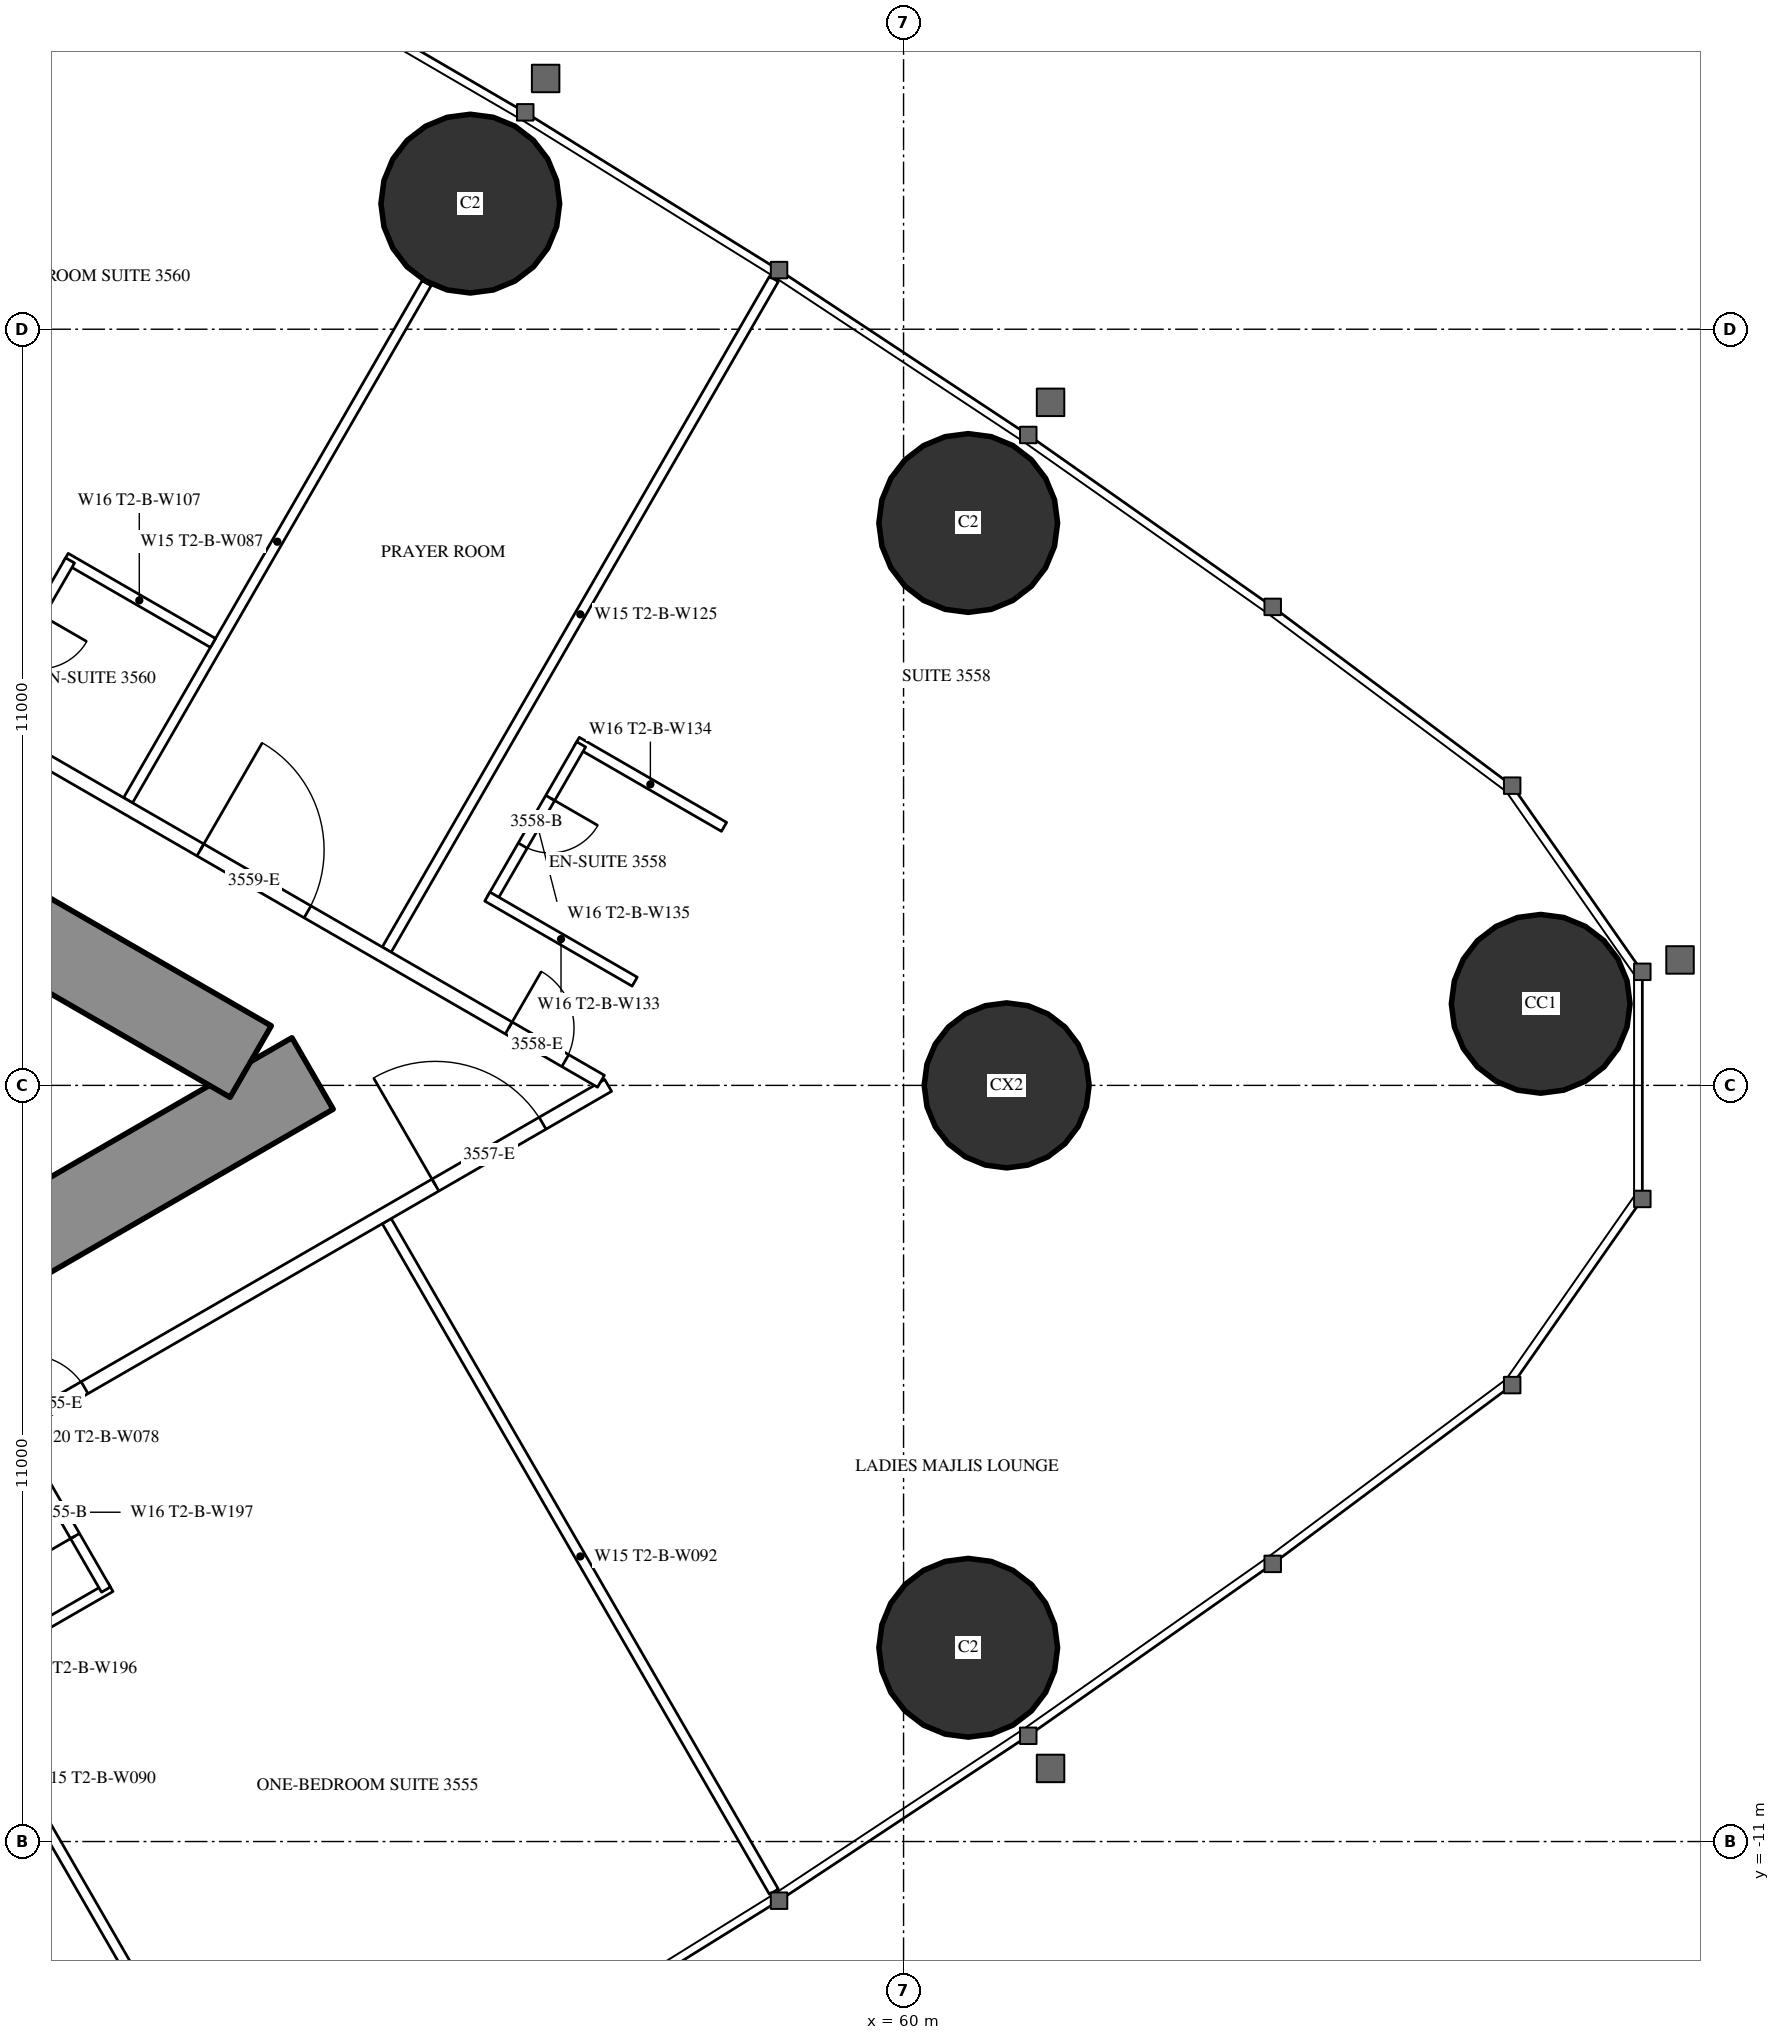
"""IFC4 building model, lengths in metres.
Left out: names, types, materials, properties, quantities, classifications, styles, units other than length and angle.
Written with IfcOpenShell. Run it as: python <this file> out.ifc"""

import sys

from ifc_helpers import new_model, si_unit, direction, frame, frame_2d, origin, origin_2d, place, context, subcontext, project, spatial, rectangle, circle, hollow_circle, extrude, element, fill, save


model = new_model("IFC4")
c1 = context("Model", 3, precision=1e-05, world=origin(), true_north=direction((0.0, 1.0)))
c2 = subcontext(c1, "Body", "Model", "MODEL_VIEW")
j1 = project(units=[si_unit("LENGTHUNIT", "METRE"), si_unit("PLANEANGLEUNIT", "RADIAN")], contexts=[c1])
p1 = place(None, origin())
s1 = spatial("IfcSite", under=j1, at=p1, CompositionType="ELEMENT")
p2 = place(p1, origin())
s2 = spatial("IfcBuilding", under=s1, at=p2, CompositionType="ELEMENT")
p3 = place(p2, frame((0.0, 0.0, 132.6)))
s3 = spatial("IfcBuildingStorey", under=s2, at=p3, CompositionType="ELEMENT", Elevation=132.6)
for number, where, z_axis, x_axis in (
    (1, (69.269, 1.187, 0.0), (0.0, 0.0, 1.0), (1.0, 0.0, 0.0)),
    (2, (60.941, 8.181, 0.0), (0.0, 0.0, 1.0), (1.0, 0.0, 0.0)),
    (3, (53.697, 12.827, 0.0), (0.0, 0.0, 1.0), (1.0, 0.0, 0.0)),
    (4, (60.941, -8.181, 0.0), (0.0, 0.0, 1.0), (1.0, 0.0, 0.0)),
):
    element("IfcColumn", number, at=place(p3, frame(where, z_axis=z_axis, x_axis=x_axis)), inside=s3, PredefinedType="COLUMN", context=c2, shape_type="SweptSolid", body=[
        extrude(hollow_circle(Radius=1.3, WallThickness=0.1, at=origin_2d()), origin(), (0.0, 0.0, 1.0), 3.5),
    ])
p4 = place(p3, frame((61.5, 0.0, 0.0), z_axis=(0.0, 0.0, 1.0), x_axis=(1.0, 0.0, 0.0)))
e5 = element("IfcColumn", 5, at=p4, inside=s3, PredefinedType="COLUMN", context=c2, shape_type="SweptSolid", body=[
    extrude(circle(Radius=1.2, at=origin_2d()), origin(), (0.0, 0.0, 1.0), 3.5),
])
p5 = place(p3, frame((27.2, -13.8, 0.0), z_axis=(0.0, 0.0, 1.0), x_axis=(0.866027159892, 0.499996958321, 0.0)))
e6 = element("IfcWall", 6, at=p5, inside=s3, PredefinedType="SHEAR", context=c2, shape_type="SweptSolid", body=[
    extrude(rectangle(XDim=27.947, YDim=1.2, at=frame_2d((13.973, 0.0))), origin(), (0.0, 0.0, 1.0), 3.5),
])
p6 = place(p5, frame((4.6, 0.0, 0.0)))
e7 = element("IfcOpeningElement", 7, at=p6, cuts=e6, PredefinedType="OPENING", context=c2, shape_type="SweptSolid", body=[
    extrude(rectangle(XDim=1.0, YDim=2.2, at=frame_2d((0.5, 1.1))), frame((0.0, 0.61, 0.0), z_axis=(0.0, -1.0, 0.0), x_axis=(1.0, 0.0, 0.0)), (0.0, 0.0, 1.0), 1.22),
])
p7 = place(p5, frame((13.395, 0.0, 0.0)))
e8 = element("IfcOpeningElement", 8, at=p7, cuts=e6, PredefinedType="OPENING", context=c2, shape_type="SweptSolid", body=[
    extrude(rectangle(XDim=1.8, YDim=2.2, at=frame_2d((0.9, 1.1))), frame((0.0, 0.61, 0.0), z_axis=(0.0, -1.0, 0.0), x_axis=(1.0, 0.0, 0.0)), (0.0, 0.0, 1.0), 1.22),
])
p8 = place(p3, frame((27.2, 13.8, 0.0), z_axis=(0.0, 0.0, 1.0), x_axis=(0.866024515034, -0.500001539357, 0.0)))
e9 = element("IfcWall", 9, at=p8, inside=s3, PredefinedType="SHEAR", context=c2, shape_type="SweptSolid", body=[
    extrude(rectangle(XDim=26.907, YDim=1.2, at=frame_2d((13.454, 0.0))), origin(), (0.0, 0.0, 1.0), 3.5),
])
p9 = place(p8, frame((4.6, 0.0, 0.0)))
e10 = element("IfcOpeningElement", 10, at=p9, cuts=e9, PredefinedType="OPENING", context=c2, shape_type="SweptSolid", body=[
    extrude(rectangle(XDim=1.0, YDim=2.2, at=frame_2d((0.5, 1.1))), frame((0.0, 0.61, 0.0), z_axis=(0.0, -1.0, 0.0), x_axis=(1.0, 0.0, 0.0)), (0.0, 0.0, 1.0), 1.22),
])
p10 = place(p8, frame((13.395, 0.0, 0.0)))
e11 = element("IfcOpeningElement", 11, at=p10, cuts=e9, PredefinedType="OPENING", context=c2, shape_type="SweptSolid", body=[
    extrude(rectangle(XDim=1.8, YDim=2.2, at=frame_2d((0.9, 1.1))), frame((0.0, 0.61, 0.0), z_axis=(0.0, -1.0, 0.0), x_axis=(1.0, 0.0, 0.0)), (0.0, 0.0, 1.0), 1.22),
])
p11 = place(p3, frame((44.954, -6.321, 0.0), z_axis=(0.0, 0.0, 1.0), x_axis=(0.500018676722, -0.866014620505, 0.0)))
e12 = element("IfcWall", 12, at=p11, inside=s3, PredefinedType="PARTITIONING", context=c2, shape_type="SweptSolid", body=[
    extrude(rectangle(XDim=8.704, YDim=0.15, at=frame_2d((4.352, 0.0))), origin(), (0.0, 0.0, 1.0), 2.2),
])
p12 = place(p3, frame((52.481, -1.975, 0.0), z_axis=(0.0, 0.0, 1.0), x_axis=(0.500003867771, -0.866023170714, 0.0)))
e13 = element("IfcWall", 13, at=p12, inside=s3, PredefinedType="PARTITIONING", context=c2, shape_type="SweptSolid", body=[
    extrude(rectangle(XDim=11.265, YDim=0.15, at=frame_2d((5.632, 0.0))), origin(), (0.0, 0.0, 1.0), 3.25),
])
p13 = place(p3, frame((48.719, 4.147, 0.0), z_axis=(0.0, 0.0, 1.0), x_axis=(0.499993328235, 0.866029255696, 0.0)))
e14 = element("IfcWall", 14, at=p13, inside=s3, PredefinedType="PARTITIONING", context=c2, shape_type="SweptSolid", body=[
    extrude(rectangle(XDim=8.686, YDim=0.15, at=frame_2d((4.343, 0.0))), origin(), (0.0, 0.0, 1.0), 2.2),
])
p14 = place(p3, frame((52.481, 1.975, 0.0), z_axis=(0.0, 0.0, 1.0), x_axis=(0.500003867771, 0.866023170714, 0.0)))
e15 = element("IfcWall", 15, at=p14, inside=s3, PredefinedType="PARTITIONING", context=c2, shape_type="SweptSolid", body=[
    extrude(rectangle(XDim=11.265, YDim=0.15, at=frame_2d((5.632, 0.0))), origin(), (0.0, 0.0, 1.0), 3.25),
])
p15 = place(p3, frame((37.96, -10.243, 0.0), z_axis=(0.0, 0.0, 1.0), x_axis=(0.866026429433, 0.499998223521, 0.0)))
e16 = element("IfcWall", 16, at=p15, inside=s3, PredefinedType="PARTITIONING", context=c2, shape_type="SweptSolid", body=[
    extrude(rectangle(XDim=20.487, YDim=0.2, at=frame_2d((10.243, 0.0))), origin(), (0.0, 0.0, 1.0), 3.25),
])
p16 = place(p15, frame((10.743, 0.0, 0.0)))
e17 = element("IfcOpeningElement", 17, at=p16, cuts=e16, PredefinedType="OPENING", context=c2, shape_type="SweptSolid", body=[
    extrude(rectangle(XDim=0.95, YDim=2.2, at=frame_2d((0.475, 1.1))), frame((0.0, 0.11, 0.0), z_axis=(0.0, -1.0, 0.0), x_axis=(1.0, 0.0, 0.0)), (0.0, 0.0, 1.0), 0.22),
])
p17 = place(p15, frame((17.586, 0.0, 0.0)))
e18 = element("IfcOpeningElement", 18, at=p17, cuts=e16, PredefinedType="OPENING", context=c2, shape_type="SweptSolid", body=[
    extrude(rectangle(XDim=1.8, YDim=2.2, at=frame_2d((0.9, 1.1))), frame((0.0, 0.11, 0.0), z_axis=(0.0, -1.0, 0.0), x_axis=(1.0, 0.0, 0.0)), (0.0, 0.0, 1.0), 0.22),
])
p18 = place(p15, frame((0.6, 0.0, 0.0)))
e19 = element("IfcOpeningElement", 19, at=p18, cuts=e16, PredefinedType="OPENING", context=c2, shape_type="SweptSolid", body=[
    extrude(rectangle(XDim=0.95, YDim=2.2, at=frame_2d((0.475, 1.1))), frame((0.0, 0.11, 0.0), z_axis=(0.0, -1.0, 0.0), x_axis=(1.0, 0.0, 0.0)), (0.0, 0.0, 1.0), 0.22),
])
p19 = place(p3, frame((36.834, 10.894, 0.0), z_axis=(0.0, 0.0, 1.0), x_axis=(0.866028157229, -0.499995230863, 0.0)))
e20 = element("IfcWall", 20, at=p19, inside=s3, PredefinedType="PARTITIONING", context=c2, shape_type="SweptSolid", body=[
    extrude(rectangle(XDim=21.667, YDim=0.2, at=frame_2d((10.833, 0.0))), origin(), (0.0, 0.0, 1.0), 3.25),
])
p20 = place(p19, frame((20.117, 0.0, 0.0)))
e21 = element("IfcOpeningElement", 21, at=p20, cuts=e20, PredefinedType="OPENING", context=c2, shape_type="SweptSolid", body=[
    extrude(rectangle(XDim=0.95, YDim=2.2, at=frame_2d((0.475, 1.1))), frame((0.0, 0.11, 0.0), z_axis=(0.0, -1.0, 0.0), x_axis=(1.0, 0.0, 0.0)), (0.0, 0.0, 1.0), 0.22),
])
p21 = place(p19, frame((14.938, 0.0, 0.0)))
e22 = element("IfcOpeningElement", 22, at=p21, cuts=e20, PredefinedType="OPENING", context=c2, shape_type="SweptSolid", body=[
    extrude(rectangle(XDim=1.8, YDim=2.2, at=frame_2d((0.9, 1.1))), frame((0.0, 0.11, 0.0), z_axis=(0.0, -1.0, 0.0), x_axis=(1.0, 0.0, 0.0)), (0.0, 0.0, 1.0), 0.22),
])
p22 = place(p19, frame((9.99, 0.0, 0.0)))
e23 = element("IfcOpeningElement", 23, at=p22, cuts=e20, PredefinedType="OPENING", context=c2, shape_type="SweptSolid", body=[
    extrude(rectangle(XDim=0.95, YDim=2.2, at=frame_2d((0.475, 1.1))), frame((0.0, 0.11, 0.0), z_axis=(0.0, -1.0, 0.0), x_axis=(1.0, 0.0, 0.0)), (0.0, 0.0, 1.0), 0.22),
])
p23 = place(p19, frame((3.35, 0.0, 0.0)))
e24 = element("IfcOpeningElement", 24, at=p23, cuts=e20, PredefinedType="OPENING", context=c2, shape_type="SweptSolid", body=[
    extrude(rectangle(XDim=1.0, YDim=2.2, at=frame_2d((0.5, 1.1))), frame((0.0, 0.11, 0.0), z_axis=(0.0, -1.0, 0.0), x_axis=(1.0, 0.0, 0.0)), (0.0, 0.0, 1.0), 0.22),
])
p24 = place(p3, frame((46.319, -8.535, 0.0), z_axis=(0.0, 0.0, 1.0), x_axis=(0.866006523861, 0.500032699561, 0.0)))
e25 = element("IfcWall", 25, at=p24, inside=s3, PredefinedType="PARTITIONING", context=c2, shape_type="SweptSolid", body=[
    extrude(rectangle(XDim=2.475, YDim=0.15, at=frame_2d((1.237, 0.0))), origin(), (0.0, 0.0, 1.0), 3.25),
])
p25 = place(p3, frame((47.097, -5.084, 0.0), z_axis=(0.0, 0.0, 1.0), x_axis=(0.500006934395, -0.866021400173, 0.0)))
e26 = element("IfcWall", 26, at=p25, inside=s3, PredefinedType="PARTITIONING", context=c2, shape_type="SweptSolid", body=[
    extrude(rectangle(XDim=2.6, YDim=0.15, at=frame_2d((1.3, 0.0))), origin(), (0.0, 0.0, 1.0), 3.25),
])
p26 = place(p25, frame((0.9, 0.0, 0.0)))
e27 = element("IfcOpeningElement", 27, at=p26, cuts=e26, PredefinedType="OPENING", context=c2, shape_type="SweptSolid", body=[
    extrude(rectangle(XDim=0.8, YDim=2.2, at=frame_2d((0.4, 1.1))), frame((0.0, 0.085, 0.0), z_axis=(0.0, -1.0, 0.0), x_axis=(1.0, 0.0, 0.0)), (0.0, 0.0, 1.0), 0.17),
])
p27 = place(p3, frame((55.245, 4.998, 0.0), z_axis=(0.0, 0.0, 1.0), x_axis=(0.866006523861, -0.500032699561, 0.0)))
e28 = element("IfcWall", 28, at=p27, inside=s3, PredefinedType="PARTITIONING", context=c2, shape_type="SweptSolid", body=[
    extrude(rectangle(XDim=2.475, YDim=0.15, at=frame_2d((1.237, 0.0))), origin(), (0.0, 0.0, 1.0), 3.25),
])
p28 = place(p3, frame((54.01, 2.709, 0.0), z_axis=(0.0, 0.0, 1.0), x_axis=(0.500006934395, 0.866021400173, 0.0)))
e29 = element("IfcWall", 29, at=p28, inside=s3, PredefinedType="PARTITIONING", context=c2, shape_type="SweptSolid", body=[
    extrude(rectangle(XDim=2.6, YDim=0.15, at=frame_2d((1.3, 0.0))), origin(), (0.0, 0.0, 1.0), 3.25),
])
p29 = place(p28, frame((0.9, 0.0, 0.0)))
e30 = element("IfcOpeningElement", 30, at=p29, cuts=e29, PredefinedType="OPENING", context=c2, shape_type="SweptSolid", body=[
    extrude(rectangle(XDim=0.8, YDim=2.2, at=frame_2d((0.4, 1.1))), frame((0.0, 0.085, 0.0), z_axis=(0.0, -1.0, 0.0), x_axis=(1.0, 0.0, 0.0)), (0.0, 0.0, 1.0), 0.17),
])
for number, where, z_axis, x_axis in (
    (31, (53.945, 2.747, 0.0), (0.0, 0.0, 1.0), (0.866, -0.5, 0.0)),
    (32, (47.81, 7.674, 0.0), (0.0, 0.0, 1.0), (0.866, -0.5, 0.0)),
):
    element("IfcWall", number, at=place(p3, frame(where, z_axis=z_axis, x_axis=x_axis)), inside=s3, PredefinedType="PARTITIONING", context=c2, shape_type="SweptSolid", body=[
        extrude(rectangle(XDim=2.475, YDim=0.15, at=frame_2d((1.238, 0.0))), origin(), (0.0, 0.0, 1.0), 3.25),
    ])
p30 = place(p3, frame((46.575, 5.385, 0.0), z_axis=(0.0, 0.0, 1.0), x_axis=(0.500006934395, 0.866021400173, 0.0)))
e33 = element("IfcWall", 33, at=p30, inside=s3, PredefinedType="PARTITIONING", context=c2, shape_type="SweptSolid", body=[
    extrude(rectangle(XDim=2.6, YDim=0.15, at=frame_2d((1.3, 0.0))), origin(), (0.0, 0.0, 1.0), 3.25),
])
p31 = place(p30, frame((0.9, 0.0, 0.0)))
e34 = element("IfcOpeningElement", 34, at=p31, cuts=e33, PredefinedType="OPENING", context=c2, shape_type="SweptSolid", body=[
    extrude(rectangle(XDim=0.8, YDim=2.2, at=frame_2d((0.4, 1.1))), frame((0.0, 0.085, 0.0), z_axis=(0.0, -1.0, 0.0), x_axis=(1.0, 0.0, 0.0)), (0.0, 0.0, 1.0), 0.17),
])
p32 = place(p26, origin())
e35 = element("IfcDoor", 35, at=p32, inside=s3, OperationType="SINGLE_SWING_RIGHT", PredefinedType="DOOR", context=c2, shape_type="SweptSolid", body=[
    extrude(rectangle(XDim=0.8, YDim=2.2, at=frame_2d((0.4, 1.1))), frame((0.0, 0.025, 0.0), z_axis=(0.0, -1.0, 0.0), x_axis=(1.0, 0.0, 0.0)), (0.0, 0.0, 1.0), 0.05),
])
fill(e27, e35)
p33 = place(p16, origin())
e36 = element("IfcDoor", 36, at=p33, inside=s3, OperationType="SINGLE_SWING_LEFT", PredefinedType="DOOR", context=c2, shape_type="SweptSolid", body=[
    extrude(rectangle(XDim=0.95, YDim=2.2, at=frame_2d((0.475, 1.1))), frame((0.0, 0.025, 0.0), z_axis=(0.0, -1.0, 0.0), x_axis=(1.0, 0.0, 0.0)), (0.0, 0.0, 1.0), 0.05),
])
fill(e17, e36)
p34 = place(p17, origin())
e37 = element("IfcDoor", 37, at=p34, inside=s3, OperationType="DOUBLE_DOOR_SINGLE_SWING", PredefinedType="DOOR", context=c2, shape_type="SweptSolid", body=[
    extrude(rectangle(XDim=1.8, YDim=2.2, at=frame_2d((0.9, 1.1))), frame((0.0, 0.025, 0.0), z_axis=(0.0, -1.0, 0.0), x_axis=(1.0, 0.0, 0.0)), (0.0, 0.0, 1.0), 0.05),
])
fill(e18, e37)
p35 = place(p29, origin())
e38 = element("IfcDoor", 38, at=p35, inside=s3, OperationType="SINGLE_SWING_RIGHT", PredefinedType="DOOR", context=c2, shape_type="SweptSolid", body=[
    extrude(rectangle(XDim=0.8, YDim=2.2, at=frame_2d((0.4, 1.1))), frame((0.0, 0.025, 0.0), z_axis=(0.0, -1.0, 0.0), x_axis=(1.0, 0.0, 0.0)), (0.0, 0.0, 1.0), 0.05),
])
fill(e30, e38)
p36 = place(p20, origin())
e39 = element("IfcDoor", 39, at=p36, inside=s3, OperationType="SINGLE_SWING_LEFT", PredefinedType="DOOR", context=c2, shape_type="SweptSolid", body=[
    extrude(rectangle(XDim=0.95, YDim=2.2, at=frame_2d((0.475, 1.1))), frame((0.0, 0.025, 0.0), z_axis=(0.0, -1.0, 0.0), x_axis=(1.0, 0.0, 0.0)), (0.0, 0.0, 1.0), 0.05),
])
fill(e21, e39)
p37 = place(p21, origin())
e40 = element("IfcDoor", 40, at=p37, inside=s3, OperationType="DOUBLE_DOOR_SINGLE_SWING", PredefinedType="DOOR", context=c2, shape_type="SweptSolid", body=[
    extrude(rectangle(XDim=1.8, YDim=2.2, at=frame_2d((0.9, 1.1))), frame((0.0, 0.025, 0.0), z_axis=(0.0, -1.0, 0.0), x_axis=(1.0, 0.0, 0.0)), (0.0, 0.0, 1.0), 0.05),
])
fill(e22, e40)
save(model, sys.argv[1])
